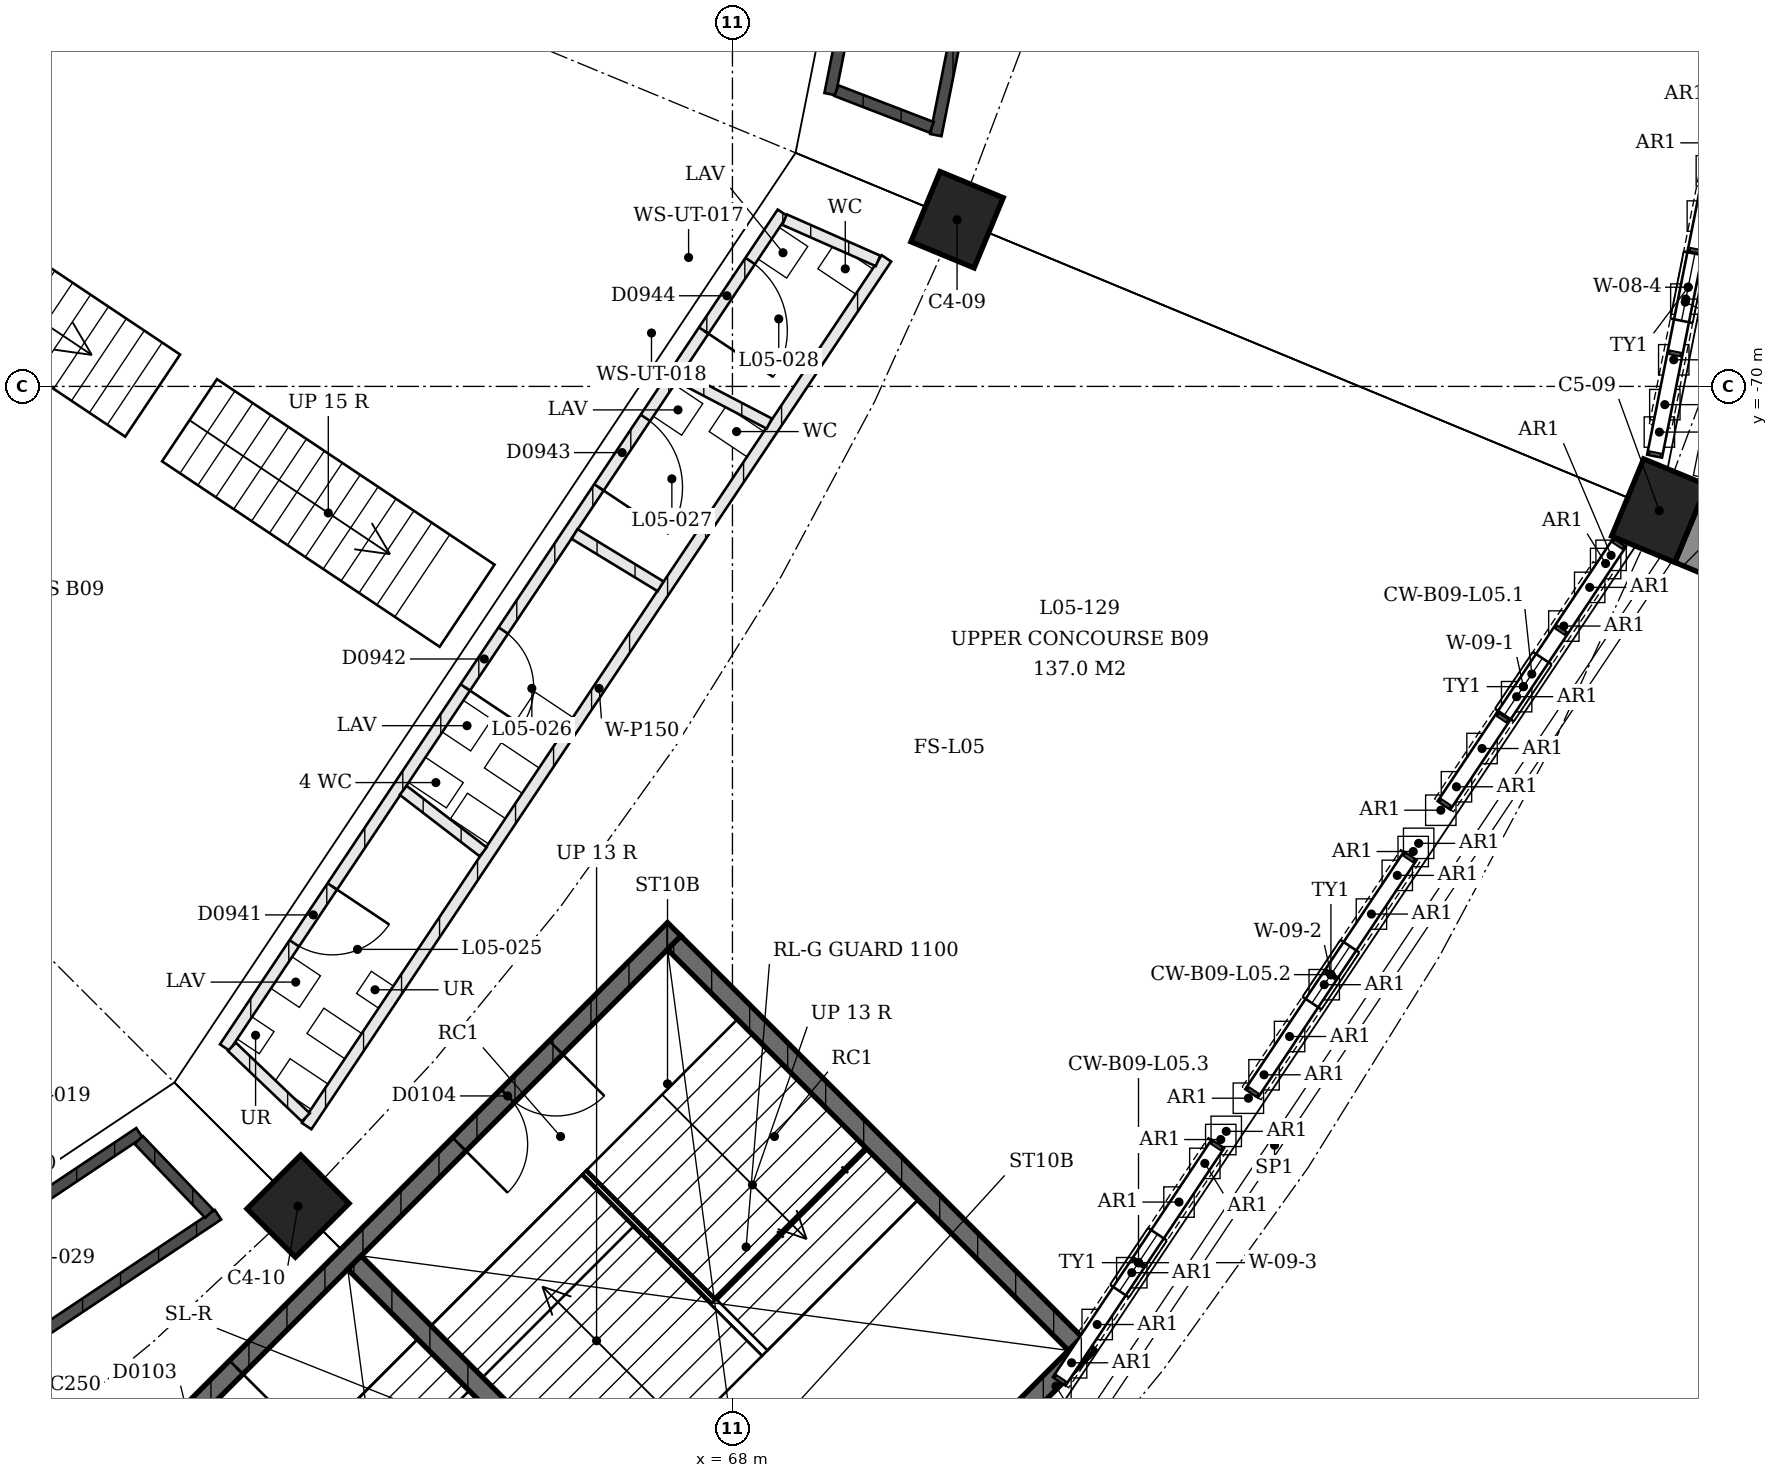
"""IFC4 building model, lengths in metres.
Left out: names, types, materials, properties, quantities, classifications, styles, units other than length and angle.
Written with IfcOpenShell. Run it as: python <this file> out.ifc"""

import sys

from ifc_helpers import new_model, si_unit, direction, frame, frame_2d, origin, origin_2d, place, context, subcontext, project, spatial, polyline, rectangle, outline, extrude, element, fill, save


model = new_model("IFC4")
c1 = context("Model", 3, precision=1e-05, world=origin(), true_north=direction((0.0, 1.0)))
c2 = subcontext(c1, "Body", "Model", "MODEL_VIEW")
j1 = project(units=[si_unit("LENGTHUNIT", "METRE"), si_unit("PLANEANGLEUNIT", "RADIAN")], contexts=[c1])
p1 = place(None, origin())
s1 = spatial("IfcSite", under=j1, at=p1, CompositionType="ELEMENT")
p2 = place(p1, origin())
s2 = spatial("IfcBuilding", under=s1, at=p2, CompositionType="ELEMENT")
p3 = place(p2, frame((0.0, 0.0, 22.5)))
s3 = spatial("IfcBuildingStorey", under=s2, at=p3, CompositionType="ELEMENT", Elevation=22.5)
p4 = place(p3, frame((70.955, -67.807, 0.0), z_axis=(0.0, 0.0, 1.0), x_axis=(0.382683432365, 0.923879532511, 0.0)))
e1 = element("IfcColumn", 1, at=p4, inside=s3, PredefinedType="COLUMN", context=c2, shape_type="SweptSolid", body=[
    extrude(rectangle(XDim=1.0, YDim=0.9, at=origin_2d()), origin(), (0.0, 0.0, 1.0), 6.5),
])
p5 = place(p3, frame((80.194, -71.634, 0.0), z_axis=(0.0, 0.0, 1.0), x_axis=(0.382683432365, 0.923879532511, 0.0)))
e2 = element("IfcColumn", 2, at=p5, inside=s3, PredefinedType="COLUMN", context=c2, shape_type="SweptSolid", body=[
    extrude(rectangle(XDim=1.1, YDim=0.9, at=origin_2d()), origin(), (0.0, 0.0, 1.0), 6.5),
])
p6 = place(p3, frame((62.284, -80.784, 0.0), z_axis=(0.0, 0.0, 1.0), x_axis=(0.707106781187, 0.707106781187, 0.0)))
e3 = element("IfcColumn", 3, at=p6, inside=s3, PredefinedType="COLUMN", context=c2, shape_type="SweptSolid", body=[
    extrude(rectangle(XDim=1.0, YDim=0.9, at=origin_2d()), origin(), (0.0, 0.0, 1.0), 6.5),
])
p7 = place(p3, frame((80.939, -66.865, 4.1), z_axis=(0.0, 0.0, 1.0), x_axis=(-0.19509691132, -0.980783969686, 0.0)))
e4 = element("IfcWall", 4, at=p7, inside=s3, PredefinedType="SOLIDWALL", context=c2, shape_type="SweptSolid", body=[
    extrude(outline(polyline([(0.0, 0.0), (3.732, 0.0), (3.732, 0.05), (3.61, 1.31), (3.249, 2.575), (2.661, 3.752), (1.866, 4.8), (1.071, 3.752), (0.483, 2.575), (0.122, 1.31), (0.0, 0.05), (0.0, 0.0)])), frame((0.0, 0.15, 0.0), z_axis=(0.0, -1.0, 0.0), x_axis=(1.0, 0.0, 0.0)), (0.0, 0.0, 1.0), 0.3),
])
p8 = place(p7, frame((1.416, 0.0, 0.4)))
e5 = element("IfcOpeningElement", 5, at=p8, cuts=e4, PredefinedType="OPENING", context=c2, shape_type="SweptSolid", body=[
    extrude(rectangle(XDim=0.9, YDim=3.6, at=frame_2d((0.45, 1.8))), frame((0.0, 0.16, 0.0), z_axis=(0.0, -1.0, 0.0), x_axis=(1.0, 0.0, 0.0)), (0.0, 0.0, 1.0), 0.32),
])
p9 = place(p3, frame((79.45, -72.388, 4.1), z_axis=(0.0, 0.0, 1.0), x_axis=(-0.555599628384, -0.831449970196, 0.0)))
e6 = element("IfcWall", 6, at=p9, inside=s3, PredefinedType="SOLIDWALL", context=c2, shape_type="SweptSolid", body=[
    extrude(outline(polyline([(0.0, 0.0), (3.757, 0.0), (3.757, 0.05), (3.635, 1.311), (3.271, 2.577), (2.678, 3.754), (1.879, 4.8), (1.079, 3.754), (0.486, 2.577), (0.123, 1.311), (0.0, 0.05), (0.0, 0.0)])), frame((0.0, 0.15, 0.0), z_axis=(0.0, -1.0, 0.0), x_axis=(1.0, 0.0, 0.0)), (0.0, 0.0, 1.0), 0.3),
])
p10 = place(p9, frame((1.428, 0.0, 0.4)))
e7 = element("IfcOpeningElement", 7, at=p10, cuts=e6, PredefinedType="OPENING", context=c2, shape_type="SweptSolid", body=[
    extrude(rectangle(XDim=0.9, YDim=3.6, at=frame_2d((0.45, 1.8))), frame((0.0, 0.16, 0.0), z_axis=(0.0, -1.0, 0.0), x_axis=(1.0, 0.0, 0.0)), (0.0, 0.0, 1.0), 0.32),
])
p11 = place(p3, frame((76.918, -76.177, 4.1), z_axis=(0.0, 0.0, 1.0), x_axis=(-0.555599628384, -0.831449970196, 0.0)))
e8 = element("IfcWall", 8, at=p11, inside=s3, PredefinedType="SOLIDWALL", context=c2, shape_type="SweptSolid", body=[
    extrude(outline(polyline([(0.0, 0.0), (3.757, 0.0), (3.757, 0.05), (3.635, 1.311), (3.271, 2.577), (2.678, 3.754), (1.879, 4.8), (1.079, 3.754), (0.486, 2.577), (0.123, 1.311), (0.0, 0.05), (0.0, 0.0)])), frame((0.0, 0.15, 0.0), z_axis=(0.0, -1.0, 0.0), x_axis=(1.0, 0.0, 0.0)), (0.0, 0.0, 1.0), 0.3),
])
p12 = place(p11, frame((1.428, 0.0, 0.4)))
e9 = element("IfcOpeningElement", 9, at=p12, cuts=e8, PredefinedType="OPENING", context=c2, shape_type="SweptSolid", body=[
    extrude(rectangle(XDim=0.9, YDim=3.6, at=frame_2d((0.45, 1.8))), frame((0.0, 0.16, 0.0), z_axis=(0.0, -1.0, 0.0), x_axis=(1.0, 0.0, 0.0)), (0.0, 0.0, 1.0), 0.32),
])
p13 = place(p3, frame((74.386, -79.966, 4.1), z_axis=(0.0, 0.0, 1.0), x_axis=(-0.555599628384, -0.831449970196, 0.0)))
e10 = element("IfcWall", 10, at=p13, inside=s3, PredefinedType="SOLIDWALL", context=c2, shape_type="SweptSolid", body=[
    extrude(outline(polyline([(0.0, 0.0), (3.757, 0.0), (3.757, 0.05), (3.635, 1.311), (3.271, 2.577), (2.678, 3.754), (1.879, 4.8), (1.079, 3.754), (0.486, 2.577), (0.123, 1.311), (0.0, 0.05), (0.0, 0.0)])), frame((0.0, 0.15, 0.0), z_axis=(0.0, -1.0, 0.0), x_axis=(1.0, 0.0, 0.0)), (0.0, 0.0, 1.0), 0.3),
])
p14 = place(p13, frame((1.428, 0.0, 0.4)))
e11 = element("IfcOpeningElement", 11, at=p14, cuts=e10, PredefinedType="OPENING", context=c2, shape_type="SweptSolid", body=[
    extrude(rectangle(XDim=0.9, YDim=3.6, at=frame_2d((0.45, 1.8))), frame((0.0, 0.16, 0.0), z_axis=(0.0, -1.0, 0.0), x_axis=(1.0, 0.0, 0.0)), (0.0, 0.0, 1.0), 0.32),
])
p15 = place(p3, frame((58.643, -85.734, 0.0), z_axis=(0.0, 0.0, 1.0), x_axis=(0.707106781187, 0.707106781187, 0.0)))
e12 = element("IfcWall", 12, at=p15, inside=s3, PredefinedType="SHEAR", context=c2, shape_type="SweptSolid", body=[
    extrude(rectangle(XDim=12.15, YDim=0.25, at=frame_2d((6.075, 0.0))), origin(), (0.0, 0.0, 1.0), 2.1),
])
p16 = place(p15, frame((2.2, 0.0, 0.0)))
e13 = element("IfcOpeningElement", 13, at=p16, cuts=e12, PredefinedType="OPENING", context=c2, shape_type="SweptSolid", body=[
    extrude(rectangle(XDim=1.8, YDim=2.1, at=frame_2d((0.9, 1.05))), frame((0.0, 0.125, 0.0), z_axis=(0.0, -1.0, 0.0), x_axis=(1.0, 0.0, 0.0)), (0.0, 0.0, 1.0), 0.25),
])
p17 = place(p15, frame((8.15, 0.0, 0.0)))
e14 = element("IfcOpeningElement", 14, at=p17, cuts=e12, PredefinedType="OPENING", context=c2, shape_type="SweptSolid", body=[
    extrude(rectangle(XDim=1.8, YDim=2.1, at=frame_2d((0.9, 1.05))), frame((0.0, 0.125, 0.0), z_axis=(0.0, -1.0, 0.0), x_axis=(1.0, 0.0, 0.0)), (0.0, 0.0, 1.0), 0.25),
])
p18 = place(p3, frame((64.094, -91.186, 0.0), z_axis=(0.0, 0.0, 1.0), x_axis=(0.707106781187, 0.707106781187, 0.0)))
e15 = element("IfcWall", 15, at=p18, inside=s3, PredefinedType="SHEAR", context=c2, shape_type="SweptSolid", body=[
    extrude(rectangle(XDim=12.15, YDim=0.25, at=frame_2d((6.075, 0.0))), origin(), (0.0, 0.0, 1.0), 2.1),
])
p19 = place(p3, frame((67.234, -77.319, 0.0), z_axis=(0.0, 0.0, 1.0), x_axis=(0.707090417709, -0.707123144286, 0.0)))
e16 = element("IfcWall", 16, at=p19, inside=s3, PredefinedType="SHEAR", context=c2, shape_type="SweptSolid", body=[
    extrude(rectangle(XDim=7.46, YDim=0.25, at=frame_2d((3.73, 0.0))), origin(), (0.0, 0.0, 1.0), 2.1),
])
p20 = place(p3, frame((63.027, -81.527, 0.0), z_axis=(0.0, 0.0, 1.0), x_axis=(0.707106781187, -0.707106781187, 0.0)))
e17 = element("IfcWall", 17, at=p20, inside=s3, PredefinedType="SHEAR", context=c2, shape_type="SweptSolid", body=[
    extrude(rectangle(XDim=7.46, YDim=0.25, at=frame_2d((3.73, 0.0))), origin(), (0.0, 0.0, 1.0), 2.1),
])
p21 = place(p3, frame((71.842, -53.293, 0.0), z_axis=(0.0, 0.0, 1.0), x_axis=(-0.195095631841, -0.980784224198, 0.0)))
e18 = element("IfcWall", 18, at=p21, inside=s3, PredefinedType="SOLIDWALL", context=c2, shape_type="SweptSolid", body=[
    extrude(rectangle(XDim=13.113, YDim=0.15, at=frame_2d((6.557, 0.0))), origin(), (0.0, 0.0, 1.0), 3.0),
])
p22 = place(p21, frame((2.815, 0.0, 0.0)))
e19 = element("IfcOpeningElement", 19, at=p22, cuts=e18, PredefinedType="OPENING", context=c2, shape_type="SweptSolid", body=[
    extrude(rectangle(XDim=1.0, YDim=2.1, at=frame_2d((0.5, 1.05))), frame((0.0, 0.075, 0.0), z_axis=(0.0, -1.0, 0.0), x_axis=(1.0, 0.0, 0.0)), (0.0, 0.0, 1.0), 0.15),
])
p23 = place(p21, frame((9.298, 0.0, 0.0)))
e20 = element("IfcOpeningElement", 20, at=p23, cuts=e18, PredefinedType="OPENING", context=c2, shape_type="SweptSolid", body=[
    extrude(rectangle(XDim=1.0, YDim=2.1, at=frame_2d((0.5, 1.05))), frame((0.0, 0.075, 0.0), z_axis=(0.0, -1.0, 0.0), x_axis=(1.0, 0.0, 0.0)), (0.0, 0.0, 1.0), 0.15),
])
p24 = place(p3, frame((73.336, -53.325, 0.0), z_axis=(0.0, 0.0, 1.0), x_axis=(-0.195086146928, -0.980786110871, 0.0)))
e21 = element("IfcWall", 21, at=p24, inside=s3, PredefinedType="SOLIDWALL", context=c2, shape_type="SweptSolid", body=[
    extrude(rectangle(XDim=13.631, YDim=0.15, at=frame_2d((6.815, 0.0))), origin(), (0.0, 0.0, 1.0), 3.0),
])
p25 = place(p3, frame((69.368, -66.109, 0.0), z_axis=(0.0, 0.0, 1.0), x_axis=(0.933331557443, -0.359015603953, 0.0)))
e22 = element("IfcWall", 22, at=p25, inside=s3, PredefinedType="SOLIDWALL", context=c2, shape_type="SweptSolid", body=[
    extrude(rectangle(XDim=1.344, YDim=0.15, at=frame_2d((0.672, 0.0))), origin(), (0.0, 0.0, 1.0), 3.0),
])
p26 = place(p3, frame((61.32, -78.697, 0.0), z_axis=(0.0, 0.0, 1.0), x_axis=(0.555570028225, 0.831469749142, 0.0)))
e23 = element("IfcWall", 23, at=p26, inside=s3, PredefinedType="PARTITIONING", context=c2, shape_type="SweptSolid", body=[
    extrude(rectangle(XDim=13.209, YDim=0.15, at=frame_2d((6.604, 0.0))), origin(), (0.0, 0.0, 1.0), 3.0),
])
p27 = place(p26, frame((1.648, 0.0, 0.0)))
e24 = element("IfcOpeningElement", 24, at=p27, cuts=e23, PredefinedType="OPENING", context=c2, shape_type="SweptSolid", body=[
    extrude(rectangle(XDim=0.9, YDim=2.1, at=frame_2d((0.45, 1.05))), frame((0.0, 0.075, 0.0), z_axis=(0.0, -1.0, 0.0), x_axis=(1.0, 0.0, 0.0)), (0.0, 0.0, 1.0), 0.15),
])
p28 = place(p26, frame((5.697, 0.0, 0.0)))
e25 = element("IfcOpeningElement", 25, at=p28, cuts=e23, PredefinedType="OPENING", context=c2, shape_type="SweptSolid", body=[
    extrude(rectangle(XDim=0.9, YDim=2.1, at=frame_2d((0.45, 1.05))), frame((0.0, 0.075, 0.0), z_axis=(0.0, -1.0, 0.0), x_axis=(1.0, 0.0, 0.0)), (0.0, 0.0, 1.0), 0.15),
])
p29 = place(p26, frame((8.863, 0.0, 0.0)))
e26 = element("IfcOpeningElement", 26, at=p29, cuts=e23, PredefinedType="OPENING", context=c2, shape_type="SweptSolid", body=[
    extrude(rectangle(XDim=1.1, YDim=2.1, at=frame_2d((0.55, 1.05))), frame((0.0, 0.075, 0.0), z_axis=(0.0, -1.0, 0.0), x_axis=(1.0, 0.0, 0.0)), (0.0, 0.0, 1.0), 0.15),
])
p30 = place(p26, frame((11.344, 0.0, 0.0)))
e27 = element("IfcOpeningElement", 27, at=p30, cuts=e23, PredefinedType="OPENING", context=c2, shape_type="SweptSolid", body=[
    extrude(rectangle(XDim=1.1, YDim=2.1, at=frame_2d((0.55, 1.05))), frame((0.0, 0.075, 0.0), z_axis=(0.0, -1.0, 0.0), x_axis=(1.0, 0.0, 0.0)), (0.0, 0.0, 1.0), 0.15),
])
p31 = place(p3, frame((62.398, -79.731, 0.0), z_axis=(0.0, 0.0, 1.0), x_axis=(0.555573905052, 0.831467158717, 0.0)))
e28 = element("IfcWall", 28, at=p31, inside=s3, PredefinedType="PARTITIONING", context=c2, shape_type="SweptSolid", body=[
    extrude(rectangle(XDim=13.73, YDim=0.15, at=frame_2d((6.865, 0.0))), origin(), (0.0, 0.0, 1.0), 3.0),
])
p32 = place(p3, frame((61.414, -78.688, 0.0), z_axis=(0.0, 0.0, 1.0), x_axis=(0.723174104738, -0.690665776072, 0.0)))
e29 = element("IfcWall", 29, at=p32, inside=s3, PredefinedType="PARTITIONING", context=c2, shape_type="SweptSolid", body=[
    extrude(rectangle(XDim=1.344, YDim=0.15, at=frame_2d((0.672, 0.0))), origin(), (0.0, 0.0, 1.0), 3.0),
])
p33 = place(p3, frame((63.668, -75.314, 0.0), z_axis=(0.0, 0.0, 1.0), x_axis=(0.792767594219, -0.609524028695, 0.0)))
e30 = element("IfcWall", 30, at=p33, inside=s3, PredefinedType="PARTITIONING", context=c2, shape_type="SweptSolid", body=[
    extrude(rectangle(XDim=1.327, YDim=0.15, at=frame_2d((0.664, 0.0))), origin(), (0.0, 0.0, 1.0), 3.0),
])
p34 = place(p3, frame((65.922, -71.941, 0.0), z_axis=(0.0, 0.0, 1.0), x_axis=(0.854109602484, -0.520093056043, 0.0)))
e31 = element("IfcWall", 31, at=p34, inside=s3, PredefinedType="PARTITIONING", context=c2, shape_type="SweptSolid", body=[
    extrude(rectangle(XDim=1.325, YDim=0.15, at=frame_2d((0.663, 0.0))), origin(), (0.0, 0.0, 1.0), 3.0),
])
p35 = place(p3, frame((67.304, -69.874, 0.0), z_axis=(0.0, 0.0, 1.0), x_axis=(0.886633867097, -0.462472037768, 0.0)))
e32 = element("IfcWall", 32, at=p35, inside=s3, PredefinedType="PARTITIONING", context=c2, shape_type="SweptSolid", body=[
    extrude(rectangle(XDim=1.332, YDim=0.15, at=frame_2d((0.666, 0.0))), origin(), (0.0, 0.0, 1.0), 3.0),
])
p36 = place(p3, frame((68.685, -67.806, 0.0), z_axis=(0.0, 0.0, 1.0), x_axis=(0.914894130368, -0.403693857048, 0.0)))
e33 = element("IfcWall", 33, at=p36, inside=s3, PredefinedType="PARTITIONING", context=c2, shape_type="SweptSolid", body=[
    extrude(rectangle(XDim=1.344, YDim=0.15, at=frame_2d((0.672, 0.0))), origin(), (0.0, 0.0, 1.0), 3.0),
])
p37 = place(p3, frame((60.197, -79.82, 0.0), z_axis=(0.0, 0.0, 1.0), x_axis=(-0.831471244595, -0.555567790114, 0.0)))
e34 = element("IfcWall", 34, at=p37, inside=s3, PredefinedType="SOLIDWALL", context=c2, shape_type="SweptSolid", body=[
    extrude(rectangle(XDim=13.113, YDim=0.15, at=frame_2d((6.557, 0.0))), origin(), (0.0, 0.0, 1.0), 3.0),
])
p38 = place(p37, frame((2.815, 0.0, 0.0)))
e35 = element("IfcOpeningElement", 35, at=p38, cuts=e34, PredefinedType="OPENING", context=c2, shape_type="SweptSolid", body=[
    extrude(rectangle(XDim=1.0, YDim=2.1, at=frame_2d((0.5, 1.05))), frame((0.0, 0.075, 0.0), z_axis=(0.0, -1.0, 0.0), x_axis=(1.0, 0.0, 0.0)), (0.0, 0.0, 1.0), 0.15),
])
p39 = place(p37, frame((9.298, 0.0, 0.0)))
e36 = element("IfcOpeningElement", 36, at=p39, cuts=e34, PredefinedType="OPENING", context=c2, shape_type="SweptSolid", body=[
    extrude(rectangle(XDim=1.0, YDim=2.1, at=frame_2d((0.5, 1.05))), frame((0.0, 0.075, 0.0), z_axis=(0.0, -1.0, 0.0), x_axis=(1.0, 0.0, 0.0)), (0.0, 0.0, 1.0), 0.15),
])
p40 = place(p3, frame((61.231, -80.898, 0.0), z_axis=(0.0, 0.0, 1.0), x_axis=(-0.831471173823, -0.555567896033, 0.0)))
e37 = element("IfcWall", 37, at=p40, inside=s3, PredefinedType="SOLIDWALL", context=c2, shape_type="SweptSolid", body=[
    extrude(rectangle(XDim=13.631, YDim=0.15, at=frame_2d((6.815, 0.0))), origin(), (0.0, 0.0, 1.0), 3.0),
])
p41 = place(p3, frame((60.188, -79.914, 0.0), z_axis=(0.0, 0.0, 1.0), x_axis=(0.690665776072, -0.723174104738, 0.0)))
e38 = element("IfcWall", 38, at=p41, inside=s3, PredefinedType="SOLIDWALL", context=c2, shape_type="SweptSolid", body=[
    extrude(rectangle(XDim=1.344, YDim=0.15, at=frame_2d((0.672, 0.0))), origin(), (0.0, 0.0, 1.0), 3.0),
])
p42 = place(p8, origin())
e39 = element("IfcWindow", 39, at=p42, inside=s3, PartitioningType="SINGLE_PANEL", PredefinedType="WINDOW", context=c2, shape_type="SweptSolid", body=[
    extrude(rectangle(XDim=0.9, YDim=3.6, at=frame_2d((0.45, 1.8))), frame((0.0, 0.03, 0.0), z_axis=(0.0, -1.0, 0.0), x_axis=(1.0, 0.0, 0.0)), (0.0, 0.0, 1.0), 0.06),
])
fill(e5, e39)
p43 = place(p10, origin())
e40 = element("IfcWindow", 40, at=p43, inside=s3, PartitioningType="SINGLE_PANEL", PredefinedType="WINDOW", context=c2, shape_type="SweptSolid", body=[
    extrude(rectangle(XDim=0.9, YDim=3.6, at=frame_2d((0.45, 1.8))), frame((0.0, 0.03, 0.0), z_axis=(0.0, -1.0, 0.0), x_axis=(1.0, 0.0, 0.0)), (0.0, 0.0, 1.0), 0.06),
])
fill(e7, e40)
p44 = place(p12, origin())
e41 = element("IfcWindow", 41, at=p44, inside=s3, PartitioningType="SINGLE_PANEL", PredefinedType="WINDOW", context=c2, shape_type="SweptSolid", body=[
    extrude(rectangle(XDim=0.9, YDim=3.6, at=frame_2d((0.45, 1.8))), frame((0.0, 0.03, 0.0), z_axis=(0.0, -1.0, 0.0), x_axis=(1.0, 0.0, 0.0)), (0.0, 0.0, 1.0), 0.06),
])
fill(e9, e41)
p45 = place(p14, origin())
e42 = element("IfcWindow", 42, at=p45, inside=s3, PartitioningType="SINGLE_PANEL", PredefinedType="WINDOW", context=c2, shape_type="SweptSolid", body=[
    extrude(rectangle(XDim=0.9, YDim=3.6, at=frame_2d((0.45, 1.8))), frame((0.0, 0.03, 0.0), z_axis=(0.0, -1.0, 0.0), x_axis=(1.0, 0.0, 0.0)), (0.0, 0.0, 1.0), 0.06),
])
fill(e11, e42)
p46 = place(p16, origin())
e43 = element("IfcDoor", 43, at=p46, inside=s3, OperationType="DOUBLE_DOOR_SINGLE_SWING", PredefinedType="DOOR", context=c2, shape_type="SweptSolid", body=[
    extrude(rectangle(XDim=1.8, YDim=2.1, at=frame_2d((0.9, 1.05))), frame((0.0, 0.025, 0.0), z_axis=(0.0, -1.0, 0.0), x_axis=(1.0, 0.0, 0.0)), (0.0, 0.0, 1.0), 0.05),
])
fill(e13, e43)
p47 = place(p17, origin())
e44 = element("IfcDoor", 44, at=p47, inside=s3, OperationType="DOUBLE_DOOR_SINGLE_SWING", PredefinedType="DOOR", context=c2, shape_type="SweptSolid", body=[
    extrude(rectangle(XDim=1.8, YDim=2.1, at=frame_2d((0.9, 1.05))), frame((0.0, 0.025, 0.0), z_axis=(0.0, -1.0, 0.0), x_axis=(1.0, 0.0, 0.0)), (0.0, 0.0, 1.0), 0.05),
])
fill(e14, e44)
p48 = place(p27, origin())
e45 = element("IfcDoor", 45, at=p48, inside=s3, OperationType="SINGLE_SWING_RIGHT", PredefinedType="DOOR", context=c2, shape_type="SweptSolid", body=[
    extrude(rectangle(XDim=0.9, YDim=2.1, at=frame_2d((0.45, 1.05))), frame((0.0, 0.025, 0.0), z_axis=(0.0, -1.0, 0.0), x_axis=(1.0, 0.0, 0.0)), (0.0, 0.0, 1.0), 0.05),
])
fill(e24, e45)
p49 = place(p28, origin())
e46 = element("IfcDoor", 46, at=p49, inside=s3, OperationType="SINGLE_SWING_LEFT", PredefinedType="DOOR", context=c2, shape_type="SweptSolid", body=[
    extrude(rectangle(XDim=0.9, YDim=2.1, at=frame_2d((0.45, 1.05))), frame((0.0, 0.025, 0.0), z_axis=(0.0, -1.0, 0.0), x_axis=(1.0, 0.0, 0.0)), (0.0, 0.0, 1.0), 0.05),
])
fill(e25, e46)
p50 = place(p29, origin())
e47 = element("IfcDoor", 47, at=p50, inside=s3, OperationType="SINGLE_SWING_LEFT", PredefinedType="DOOR", context=c2, shape_type="SweptSolid", body=[
    extrude(rectangle(XDim=1.1, YDim=2.1, at=frame_2d((0.55, 1.05))), frame((0.0, 0.025, 0.0), z_axis=(0.0, -1.0, 0.0), x_axis=(1.0, 0.0, 0.0)), (0.0, 0.0, 1.0), 0.05),
])
fill(e26, e47)
p51 = place(p30, origin())
e48 = element("IfcDoor", 48, at=p51, inside=s3, OperationType="SINGLE_SWING_LEFT", PredefinedType="DOOR", context=c2, shape_type="SweptSolid", body=[
    extrude(rectangle(XDim=1.1, YDim=2.1, at=frame_2d((0.55, 1.05))), frame((0.0, 0.025, 0.0), z_axis=(0.0, -1.0, 0.0), x_axis=(1.0, 0.0, 0.0)), (0.0, 0.0, 1.0), 0.05),
])
fill(e27, e48)
save(model, sys.argv[1])
